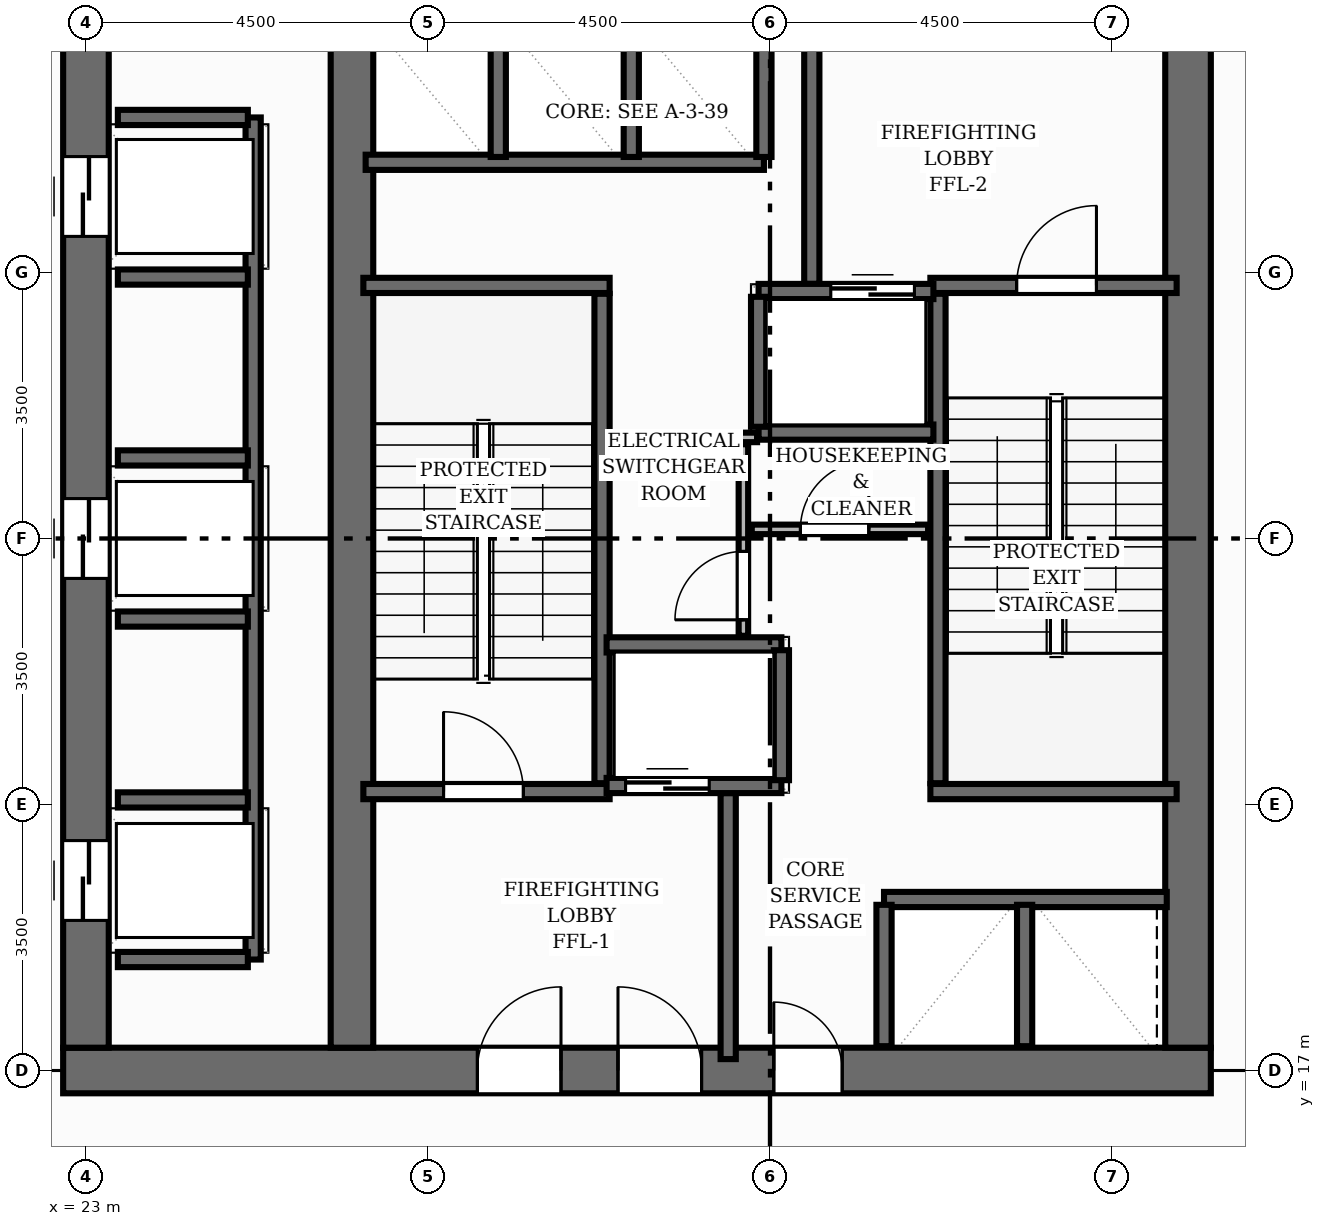
"""IFC4 building model, lengths in metres.
Left out: names, types, materials, properties, quantities, classifications, styles, units other than length and angle.
Written with IfcOpenShell. Run it as: python <this file> out.ifc"""

import sys

from ifc_helpers import new_model, si_unit, direction, frame, frame_2d, origin, place, context, subcontext, project, spatial, rectangle, extrude, element, fill, save


model = new_model("IFC4")
c1 = context("Model", 3, precision=1e-05, world=origin(), true_north=direction((0.0, 1.0)))
c2 = subcontext(c1, "Body", "Model", "MODEL_VIEW")
j1 = project(units=[si_unit("LENGTHUNIT", "METRE"), si_unit("PLANEANGLEUNIT", "RADIAN")], contexts=[c1])
p1 = place(None, origin())
s1 = spatial("IfcSite", under=j1, at=p1, CompositionType="ELEMENT")
p2 = place(p1, origin())
s2 = spatial("IfcBuilding", under=s1, at=p2, CompositionType="ELEMENT")
p3 = place(p2, frame((0.0, 0.0, 158.56)))
s3 = spatial("IfcBuildingStorey", under=s2, at=p3, CompositionType="ELEMENT", Elevation=158.56)
p4 = place(p3, frame((22.7, 17.0, 0.0), z_axis=(0.0, 0.0, 1.0), x_axis=(1.0, 0.0, 0.0)))
e1 = element("IfcWall", 1, at=p4, inside=s3, PredefinedType="SHEAR", context=c2, shape_type="SweptSolid", body=[
    extrude(rectangle(XDim=15.1, YDim=0.6, at=frame_2d((7.55, 0.0))), origin(), (0.0, 0.0, 1.0), 4.48),
])
p5 = place(p4, frame((5.45, 0.0, 0.0)))
e2 = element("IfcOpeningElement", 2, at=p5, cuts=e1, PredefinedType="OPENING", context=c2, shape_type="SweptSolid", body=[
    extrude(rectangle(XDim=1.1, YDim=2.15, at=frame_2d((0.55, 1.075))), frame((0.0, 0.31, 0.0), z_axis=(0.0, -1.0, 0.0), x_axis=(1.0, 0.0, 0.0)), (0.0, 0.0, 1.0), 0.62),
])
p6 = place(p4, frame((7.3, 0.0, 0.0)))
e3 = element("IfcOpeningElement", 3, at=p6, cuts=e1, PredefinedType="OPENING", context=c2, shape_type="SweptSolid", body=[
    extrude(rectangle(XDim=1.1, YDim=2.15, at=frame_2d((0.55, 1.075))), frame((0.0, 0.31, 0.0), z_axis=(0.0, -1.0, 0.0), x_axis=(1.0, 0.0, 0.0)), (0.0, 0.0, 1.0), 0.62),
])
p7 = place(p4, frame((9.35, 0.0, 0.0)))
e4 = element("IfcOpeningElement", 4, at=p7, cuts=e1, PredefinedType="OPENING", context=c2, shape_type="SweptSolid", body=[
    extrude(rectangle(XDim=0.9, YDim=2.1, at=frame_2d((0.45, 1.05))), frame((0.0, 0.31, 0.0), z_axis=(0.0, -1.0, 0.0), x_axis=(1.0, 0.0, 0.0)), (0.0, 0.0, 1.0), 0.62),
])
p8 = place(p3, frame((23.0, 17.3, 0.0), z_axis=(0.0, 0.0, 1.0), x_axis=(0.0, 1.0, 0.0)))
e5 = element("IfcWall", 5, at=p8, inside=s3, PredefinedType="SHEAR", context=c2, shape_type="SweptSolid", body=[
    extrude(rectangle(XDim=13.4, YDim=0.6, at=frame_2d((6.7, 0.0))), origin(), (0.0, 0.0, 1.0), 4.48),
])
p9 = place(p8, frame((1.675, 0.0, 0.0)))
e6 = element("IfcOpeningElement", 6, at=p9, cuts=e5, PredefinedType="OPENING", context=c2, shape_type="SweptSolid", body=[
    extrude(rectangle(XDim=1.05, YDim=2.15, at=frame_2d((0.525, 1.075))), frame((0.0, 0.31, 0.0), z_axis=(0.0, -1.0, 0.0), x_axis=(1.0, 0.0, 0.0)), (0.0, 0.0, 1.0), 0.62),
])
p10 = place(p8, frame((6.175, 0.0, 0.0)))
e7 = element("IfcOpeningElement", 7, at=p10, cuts=e5, PredefinedType="OPENING", context=c2, shape_type="SweptSolid", body=[
    extrude(rectangle(XDim=1.05, YDim=2.15, at=frame_2d((0.525, 1.075))), frame((0.0, 0.31, 0.0), z_axis=(0.0, -1.0, 0.0), x_axis=(1.0, 0.0, 0.0)), (0.0, 0.0, 1.0), 0.62),
])
p11 = place(p8, frame((10.675, 0.0, 0.0)))
e8 = element("IfcOpeningElement", 8, at=p11, cuts=e5, PredefinedType="OPENING", context=c2, shape_type="SweptSolid", body=[
    extrude(rectangle(XDim=1.05, YDim=2.15, at=frame_2d((0.525, 1.075))), frame((0.0, 0.31, 0.0), z_axis=(0.0, -1.0, 0.0), x_axis=(1.0, 0.0, 0.0)), (0.0, 0.0, 1.0), 0.62),
])
p12 = place(p3, frame((37.5, 17.3, 0.0), z_axis=(0.0, 0.0, 1.0), x_axis=(0.0, 1.0, 0.0)))
e9 = element("IfcWall", 9, at=p12, inside=s3, PredefinedType="SHEAR", context=c2, shape_type="SweptSolid", body=[
    extrude(rectangle(XDim=13.4, YDim=0.6, at=frame_2d((6.7, 0.0))), origin(), (0.0, 0.0, 1.0), 4.48),
])
p13 = place(p3, frame((26.5, 17.3, 0.0), z_axis=(0.0, 0.0, 1.0), x_axis=(0.0, 1.0, 0.0)))
e10 = element("IfcWall", 10, at=p13, inside=s3, PredefinedType="SHEAR", context=c2, shape_type="SweptSolid", body=[
    extrude(rectangle(XDim=13.4, YDim=0.56, at=frame_2d((6.7, 0.0))), origin(), (0.0, 0.0, 1.0), 4.48),
])
p14 = place(p3, frame((29.79, 20.78, 0.0), z_axis=(0.0, 0.0, 1.0), x_axis=(0.0, 1.0, 0.0)))
e11 = element("IfcWall", 11, at=p14, inside=s3, PredefinedType="SHEAR", context=c2, shape_type="SweptSolid", body=[
    extrude(rectangle(XDim=6.44, YDim=0.2, at=frame_2d((3.22, 0.0))), origin(), (0.0, 0.0, 1.0), 4.48),
])
p15 = place(p3, frame((26.65, 27.33, 0.0), z_axis=(0.0, 0.0, 1.0), x_axis=(1.0, 0.0, 0.0)))
e12 = element("IfcWall", 12, at=p15, inside=s3, PredefinedType="SHEAR", context=c2, shape_type="SweptSolid", body=[
    extrude(rectangle(XDim=3.24, YDim=0.2, at=frame_2d((1.62, 0.0))), origin(), (0.0, 0.0, 1.0), 4.48),
])
p16 = place(p3, frame((26.65, 20.67, 0.0), z_axis=(0.0, 0.0, 1.0), x_axis=(1.0, 0.0, 0.0)))
e13 = element("IfcWall", 13, at=p16, inside=s3, PredefinedType="SHEAR", context=c2, shape_type="SweptSolid", body=[
    extrude(rectangle(XDim=3.24, YDim=0.2, at=frame_2d((1.62, 0.0))), origin(), (0.0, 0.0, 1.0), 4.48),
])
p17 = place(p16, frame((1.055, 0.0, 0.0)))
e14 = element("IfcOpeningElement", 14, at=p17, cuts=e13, PredefinedType="OPENING", context=c2, shape_type="SweptSolid", body=[
    extrude(rectangle(XDim=1.05, YDim=2.15, at=frame_2d((0.525, 1.075))), frame((0.0, 0.11, 0.0), z_axis=(0.0, -1.0, 0.0), x_axis=(1.0, 0.0, 0.0)), (0.0, 0.0, 1.0), 0.22),
])
p18 = place(p3, frame((34.21, 20.78, 0.0), z_axis=(0.0, 0.0, 1.0), x_axis=(0.0, 1.0, 0.0)))
e15 = element("IfcWall", 15, at=p18, inside=s3, PredefinedType="SHEAR", context=c2, shape_type="SweptSolid", body=[
    extrude(rectangle(XDim=6.44, YDim=0.2, at=frame_2d((3.22, 0.0))), origin(), (0.0, 0.0, 1.0), 4.48),
])
p19 = place(p3, frame((34.11, 20.67, 0.0), z_axis=(0.0, 0.0, 1.0), x_axis=(1.0, 0.0, 0.0)))
e16 = element("IfcWall", 16, at=p19, inside=s3, PredefinedType="SHEAR", context=c2, shape_type="SweptSolid", body=[
    extrude(rectangle(XDim=3.24, YDim=0.2, at=frame_2d((1.62, 0.0))), origin(), (0.0, 0.0, 1.0), 4.48),
])
p20 = place(p3, frame((34.11, 27.33, 0.0), z_axis=(0.0, 0.0, 1.0), x_axis=(1.0, 0.0, 0.0)))
e17 = element("IfcWall", 17, at=p20, inside=s3, PredefinedType="SHEAR", context=c2, shape_type="SweptSolid", body=[
    extrude(rectangle(XDim=3.24, YDim=0.2, at=frame_2d((1.62, 0.0))), origin(), (0.0, 0.0, 1.0), 4.48),
])
p21 = place(p20, frame((1.135, 0.0, 0.0)))
e18 = element("IfcOpeningElement", 18, at=p21, cuts=e17, PredefinedType="OPENING", context=c2, shape_type="SweptSolid", body=[
    extrude(rectangle(XDim=1.05, YDim=2.15, at=frame_2d((0.525, 1.075))), frame((0.0, 0.11, 0.0), z_axis=(0.0, -1.0, 0.0), x_axis=(1.0, 0.0, 0.0)), (0.0, 0.0, 1.0), 0.22),
])
for number, where, z_axis, x_axis in (
    (19, (31.45, 17.15, 0.0), (0.0, 0.0, 1.0), (0.0, 1.0, 0.0)),
    (20, (32.55, 27.35, 0.0), (0.0, 0.0, 1.0), (0.0, 1.0, 0.0)),
):
    element("IfcWall", number, at=place(p3, frame(where, z_axis=z_axis, x_axis=x_axis)), inside=s3, PredefinedType="SHEAR", context=c2, shape_type="SweptSolid", body=[
        extrude(rectangle(XDim=3.5, YDim=0.2, at=frame_2d((1.75, 0.0))), origin(), (0.0, 0.0, 1.0), 4.48),
    ])
p22 = place(p3, frame((29.85, 20.75, 0.0), z_axis=(0.0, 0.0, 1.0), x_axis=(1.0, 0.0, 0.0)))
e21 = element("IfcWall", 21, at=p22, inside=s3, PredefinedType="SHEAR", context=c2, shape_type="SweptSolid", body=[
    extrude(rectangle(XDim=2.3, YDim=0.2, at=frame_2d((1.15, 0.0))), origin(), (0.0, 0.0, 1.0), 4.48),
])
p23 = place(p22, frame((0.25, 0.0, 0.0)))
e22 = element("IfcOpeningElement", 22, at=p23, cuts=e21, PredefinedType="OPENING", context=c2, shape_type="SweptSolid", body=[
    extrude(rectangle(XDim=1.1, YDim=2.15, at=frame_2d((0.55, 1.075))), frame((0.0, 0.11, 0.0), z_axis=(0.0, -1.0, 0.0), x_axis=(1.0, 0.0, 0.0)), (0.0, 0.0, 1.0), 0.22),
])
p24 = place(p3, frame((29.85, 22.6, 0.0), z_axis=(0.0, 0.0, 1.0), x_axis=(1.0, 0.0, 0.0)))
e23 = element("IfcWall", 23, at=p24, inside=s3, PredefinedType="SHEAR", context=c2, shape_type="SweptSolid", body=[
    extrude(rectangle(XDim=2.3, YDim=0.2, at=frame_2d((1.15, 0.0))), origin(), (0.0, 0.0, 1.0), 4.48),
])
p25 = place(p3, frame((32.15, 20.82, 0.0), z_axis=(0.0, 0.0, 1.0), x_axis=(0.0, 1.0, 0.0)))
e24 = element("IfcWall", 24, at=p25, inside=s3, PredefinedType="SHEAR", context=c2, shape_type="SweptSolid", body=[
    extrude(rectangle(XDim=1.71, YDim=0.2, at=frame_2d((0.855, 0.0))), origin(), (0.0, 0.0, 1.0), 4.48),
])
p26 = place(p3, frame((31.85, 27.25, 0.0), z_axis=(0.0, 0.0, 1.0), x_axis=(1.0, 0.0, 0.0)))
e25 = element("IfcWall", 25, at=p26, inside=s3, PredefinedType="SHEAR", context=c2, shape_type="SweptSolid", body=[
    extrude(rectangle(XDim=2.3, YDim=0.2, at=frame_2d((1.15, 0.0))), origin(), (0.0, 0.0, 1.0), 4.48),
])
p27 = place(p26, frame((0.95, 0.0, 0.0)))
e26 = element("IfcOpeningElement", 26, at=p27, cuts=e25, PredefinedType="OPENING", context=c2, shape_type="SweptSolid", body=[
    extrude(rectangle(XDim=1.1, YDim=2.15, at=frame_2d((0.55, 1.075))), frame((0.0, 0.11, 0.0), z_axis=(0.0, -1.0, 0.0), x_axis=(1.0, 0.0, 0.0)), (0.0, 0.0, 1.0), 0.22),
])
p28 = place(p3, frame((31.85, 25.4, 0.0), z_axis=(0.0, 0.0, 1.0), x_axis=(1.0, 0.0, 0.0)))
e27 = element("IfcWall", 27, at=p28, inside=s3, PredefinedType="SHEAR", context=c2, shape_type="SweptSolid", body=[
    extrude(rectangle(XDim=2.3, YDim=0.2, at=frame_2d((1.15, 0.0))), origin(), (0.0, 0.0, 1.0), 4.48),
])
p29 = place(p3, frame((31.85, 25.47, 0.0), z_axis=(0.0, 0.0, 1.0), x_axis=(0.0, 1.0, 0.0)))
e28 = element("IfcWall", 28, at=p29, inside=s3, PredefinedType="SHEAR", context=c2, shape_type="SweptSolid", body=[
    extrude(rectangle(XDim=1.71, YDim=0.2, at=frame_2d((0.855, 0.0))), origin(), (0.0, 0.0, 1.0), 4.48),
])
p30 = place(p3, frame((25.2, 18.46, 0.0), z_axis=(0.0, 0.0, 1.0), x_axis=(0.0, 1.0, 0.0)))
e29 = element("IfcWall", 29, at=p30, inside=s3, PredefinedType="SHEAR", context=c2, shape_type="SweptSolid", body=[
    extrude(rectangle(XDim=11.08, YDim=0.2, at=frame_2d((5.54, 0.0))), origin(), (0.0, 0.0, 1.0), 4.48),
])
for number, where, z_axis, x_axis in (
    (30, (23.42, 18.46, 0.0), (0.0, 0.0, 1.0), (1.0, 0.0, 0.0)),
    (31, (23.42, 29.54, 0.0), (0.0, 0.0, 1.0), (1.0, 0.0, 0.0)),
    (32, (23.42, 20.56, 0.0), (0.0, 0.0, 1.0), (1.0, 0.0, 0.0)),
    (33, (23.42, 22.94, 0.0), (0.0, 0.0, 1.0), (1.0, 0.0, 0.0)),
    (34, (23.42, 25.06, 0.0), (0.0, 0.0, 1.0), (1.0, 0.0, 0.0)),
    (35, (23.42, 27.44, 0.0), (0.0, 0.0, 1.0), (1.0, 0.0, 0.0)),
):
    element("IfcWall", number, at=place(p3, frame(where, z_axis=z_axis, x_axis=x_axis)), inside=s3, PredefinedType="SHEAR", context=c2, shape_type="SweptSolid", body=[
        extrude(rectangle(XDim=1.71, YDim=0.2, at=frame_2d((0.855, 0.0))), origin(), (0.0, 0.0, 1.0), 4.48),
    ])
p31 = place(p3, frame((26.68, 28.95, 0.0), z_axis=(0.0, 0.0, 1.0), x_axis=(1.0, 0.0, 0.0)))
e36 = element("IfcWall", 36, at=p31, inside=s3, PredefinedType="SHEAR", context=c2, shape_type="SweptSolid", body=[
    extrude(rectangle(XDim=5.24, YDim=0.2, at=frame_2d((2.62, 0.0))), origin(), (0.0, 0.0, 1.0), 4.48),
])
for number, where, z_axis, x_axis in (
    (37, (31.92, 29.02, 0.0), (0.0, 0.0, 1.0), (0.0, 1.0, 0.0)),
    (38, (28.425, 29.02, 0.0), (0.0, 0.0, 1.0), (0.0, 1.0, 0.0)),
    (39, (30.175, 29.02, 0.0), (0.0, 0.0, 1.0), (0.0, 1.0, 0.0)),
):
    element("IfcWall", number, at=place(p3, frame(where, z_axis=z_axis, x_axis=x_axis)), inside=s3, PredefinedType="SHEAR", context=c2, shape_type="SweptSolid", body=[
        extrude(rectangle(XDim=1.66, YDim=0.2, at=frame_2d((0.83, 0.0))), origin(), (0.0, 0.0, 1.0), 4.48),
    ])
p32 = place(p3, frame((33.5, 19.25, 0.0), z_axis=(0.0, 0.0, 1.0), x_axis=(1.0, 0.0, 0.0)))
e40 = element("IfcWall", 40, at=p32, inside=s3, PredefinedType="SHEAR", context=c2, shape_type="SweptSolid", body=[
    extrude(rectangle(XDim=3.72, YDim=0.2, at=frame_2d((1.86, 0.0))), origin(), (0.0, 0.0, 1.0), 4.48),
])
for number, where, z_axis, x_axis in (
    (41, (33.5, 17.32, 0.0), (0.0, 0.0, 1.0), (0.0, 1.0, 0.0)),
    (42, (35.35, 17.32, 0.0), (0.0, 0.0, 1.0), (0.0, 1.0, 0.0)),
):
    element("IfcWall", number, at=place(p3, frame(where, z_axis=z_axis, x_axis=x_axis)), inside=s3, PredefinedType="SHEAR", context=c2, shape_type="SweptSolid", body=[
        extrude(rectangle(XDim=1.86, YDim=0.2, at=frame_2d((0.93, 0.0))), origin(), (0.0, 0.0, 1.0), 4.48),
    ])
p33 = place(p3, frame((31.65, 22.72, 0.0), z_axis=(0.0, 0.0, 1.0), x_axis=(0.0, 1.0, 0.0)))
e43 = element("IfcWall", 43, at=p33, inside=s3, PredefinedType="PARTITIONING", context=c2, shape_type="SweptSolid", body=[
    extrude(rectangle(XDim=2.52, YDim=0.125, at=frame_2d((1.26, 0.0))), origin(), (0.0, 0.0, 1.0), 4.235),
])
p34 = place(p33, frame((0.21, 0.0, 0.0)))
e44 = element("IfcOpeningElement", 44, at=p34, cuts=e43, PredefinedType="OPENING", context=c2, shape_type="SweptSolid", body=[
    extrude(rectangle(XDim=0.9, YDim=2.1, at=frame_2d((0.45, 1.05))), frame((0.0, 0.073, 0.0), z_axis=(0.0, -1.0, 0.0), x_axis=(1.0, 0.0, 0.0)), (0.0, 0.0, 1.0), 0.145),
])
p35 = place(p3, frame((31.76, 24.12, 0.0), z_axis=(0.0, 0.0, 1.0), x_axis=(1.0, 0.0, 0.0)))
e45 = element("IfcWall", 45, at=p35, inside=s3, PredefinedType="PARTITIONING", context=c2, shape_type="SweptSolid", body=[
    extrude(rectangle(XDim=2.32, YDim=0.125, at=frame_2d((1.16, 0.0))), origin(), (0.0, 0.0, 1.0), 4.235),
])
p36 = place(p35, frame((0.64, 0.0, 0.0)))
e46 = element("IfcOpeningElement", 46, at=p36, cuts=e45, PredefinedType="OPENING", context=c2, shape_type="SweptSolid", body=[
    extrude(rectangle(XDim=0.9, YDim=2.1, at=frame_2d((0.45, 1.05))), frame((0.0, 0.073, 0.0), z_axis=(0.0, -1.0, 0.0), x_axis=(1.0, 0.0, 0.0)), (0.0, 0.0, 1.0), 0.145),
])
p37 = place(p3, frame((29.89, 25.33, 0.0), z_axis=(0.0, 0.0, 1.0), x_axis=(1.0, 0.0, 0.0)))
e47 = element("IfcWall", 47, at=p37, inside=s3, PredefinedType="PARTITIONING", context=c2, shape_type="SweptSolid", body=[
    extrude(rectangle(XDim=1.94, YDim=0.125, at=frame_2d((0.97, 0.0))), origin(), (0.0, 0.0, 1.0), 4.235),
])
p38 = place(p17, origin())
e48 = element("IfcDoor", 48, at=p38, inside=s3, OperationType="SINGLE_SWING_LEFT", PredefinedType="DOOR", context=c2, shape_type="SweptSolid", body=[
    extrude(rectangle(XDim=1.05, YDim=2.15, at=frame_2d((0.525, 1.075))), frame((0.0, 0.025, 0.0), z_axis=(0.0, -1.0, 0.0), x_axis=(1.0, 0.0, 0.0)), (0.0, 0.0, 1.0), 0.05),
])
fill(e14, e48)
p39 = place(p21, origin())
e49 = element("IfcDoor", 49, at=p39, inside=s3, OperationType="SINGLE_SWING_RIGHT", PredefinedType="DOOR", context=c2, shape_type="SweptSolid", body=[
    extrude(rectangle(XDim=1.05, YDim=2.15, at=frame_2d((0.525, 1.075))), frame((0.0, 0.025, 0.0), z_axis=(0.0, -1.0, 0.0), x_axis=(1.0, 0.0, 0.0)), (0.0, 0.0, 1.0), 0.05),
])
fill(e18, e49)
p40 = place(p5, origin())
e50 = element("IfcDoor", 50, at=p40, inside=s3, OperationType="SINGLE_SWING_RIGHT", PredefinedType="DOOR", context=c2, shape_type="SweptSolid", body=[
    extrude(rectangle(XDim=1.1, YDim=2.15, at=frame_2d((0.55, 1.075))), frame((0.0, 0.025, 0.0), z_axis=(0.0, -1.0, 0.0), x_axis=(1.0, 0.0, 0.0)), (0.0, 0.0, 1.0), 0.05),
])
fill(e2, e50)
p41 = place(p6, origin())
e51 = element("IfcDoor", 51, at=p41, inside=s3, OperationType="SINGLE_SWING_LEFT", PredefinedType="DOOR", context=c2, shape_type="SweptSolid", body=[
    extrude(rectangle(XDim=1.1, YDim=2.15, at=frame_2d((0.55, 1.075))), frame((0.0, 0.025, 0.0), z_axis=(0.0, -1.0, 0.0), x_axis=(1.0, 0.0, 0.0)), (0.0, 0.0, 1.0), 0.05),
])
fill(e3, e51)
p42 = place(p23, origin())
e52 = element("IfcDoor", 52, at=p42, inside=s3, OperationType="DOUBLE_DOOR_SLIDING", PredefinedType="DOOR", context=c2, shape_type="SweptSolid", body=[
    extrude(rectangle(XDim=1.1, YDim=2.15, at=frame_2d((0.55, 1.075))), frame((0.0, 0.025, 0.0), z_axis=(0.0, -1.0, 0.0), x_axis=(1.0, 0.0, 0.0)), (0.0, 0.0, 1.0), 0.05),
])
fill(e22, e52)
p43 = place(p27, origin())
e53 = element("IfcDoor", 53, at=p43, inside=s3, OperationType="DOUBLE_DOOR_SLIDING", PredefinedType="DOOR", context=c2, shape_type="SweptSolid", body=[
    extrude(rectangle(XDim=1.1, YDim=2.15, at=frame_2d((0.55, 1.075))), frame((0.0, 0.025, 0.0), z_axis=(0.0, -1.0, 0.0), x_axis=(1.0, 0.0, 0.0)), (0.0, 0.0, 1.0), 0.05),
])
fill(e26, e53)
p44 = place(p9, origin())
e54 = element("IfcDoor", 54, at=p44, inside=s3, OperationType="DOUBLE_DOOR_SLIDING", PredefinedType="DOOR", context=c2, shape_type="SweptSolid", body=[
    extrude(rectangle(XDim=1.05, YDim=2.15, at=frame_2d((0.525, 1.075))), frame((0.0, 0.025, 0.0), z_axis=(0.0, -1.0, 0.0), x_axis=(1.0, 0.0, 0.0)), (0.0, 0.0, 1.0), 0.05),
])
fill(e6, e54)
p45 = place(p10, origin())
e55 = element("IfcDoor", 55, at=p45, inside=s3, OperationType="DOUBLE_DOOR_SLIDING", PredefinedType="DOOR", context=c2, shape_type="SweptSolid", body=[
    extrude(rectangle(XDim=1.05, YDim=2.15, at=frame_2d((0.525, 1.075))), frame((0.0, 0.025, 0.0), z_axis=(0.0, -1.0, 0.0), x_axis=(1.0, 0.0, 0.0)), (0.0, 0.0, 1.0), 0.05),
])
fill(e7, e55)
p46 = place(p11, origin())
e56 = element("IfcDoor", 56, at=p46, inside=s3, OperationType="DOUBLE_DOOR_SLIDING", PredefinedType="DOOR", context=c2, shape_type="SweptSolid", body=[
    extrude(rectangle(XDim=1.05, YDim=2.15, at=frame_2d((0.525, 1.075))), frame((0.0, 0.025, 0.0), z_axis=(0.0, -1.0, 0.0), x_axis=(1.0, 0.0, 0.0)), (0.0, 0.0, 1.0), 0.05),
])
fill(e8, e56)
p47 = place(p7, origin())
e57 = element("IfcDoor", 57, at=p47, inside=s3, OperationType="SINGLE_SWING_LEFT", PredefinedType="DOOR", context=c2, shape_type="SweptSolid", body=[
    extrude(rectangle(XDim=0.9, YDim=2.1, at=frame_2d((0.45, 1.05))), frame((0.0, 0.025, 0.0), z_axis=(0.0, -1.0, 0.0), x_axis=(1.0, 0.0, 0.0)), (0.0, 0.0, 1.0), 0.05),
])
fill(e4, e57)
p48 = place(p34, origin())
e58 = element("IfcDoor", 58, at=p48, inside=s3, OperationType="SINGLE_SWING_LEFT", PredefinedType="DOOR", context=c2, shape_type="SweptSolid", body=[
    extrude(rectangle(XDim=0.9, YDim=2.1, at=frame_2d((0.45, 1.05))), frame((0.0, 0.025, 0.0), z_axis=(0.0, -1.0, 0.0), x_axis=(1.0, 0.0, 0.0)), (0.0, 0.0, 1.0), 0.05),
])
fill(e44, e58)
p49 = place(p36, origin())
e59 = element("IfcDoor", 59, at=p49, inside=s3, OperationType="SINGLE_SWING_RIGHT", PredefinedType="DOOR", context=c2, shape_type="SweptSolid", body=[
    extrude(rectangle(XDim=0.9, YDim=2.1, at=frame_2d((0.45, 1.05))), frame((0.0, 0.025, 0.0), z_axis=(0.0, -1.0, 0.0), x_axis=(1.0, 0.0, 0.0)), (0.0, 0.0, 1.0), 0.05),
])
fill(e46, e59)
save(model, sys.argv[1])
